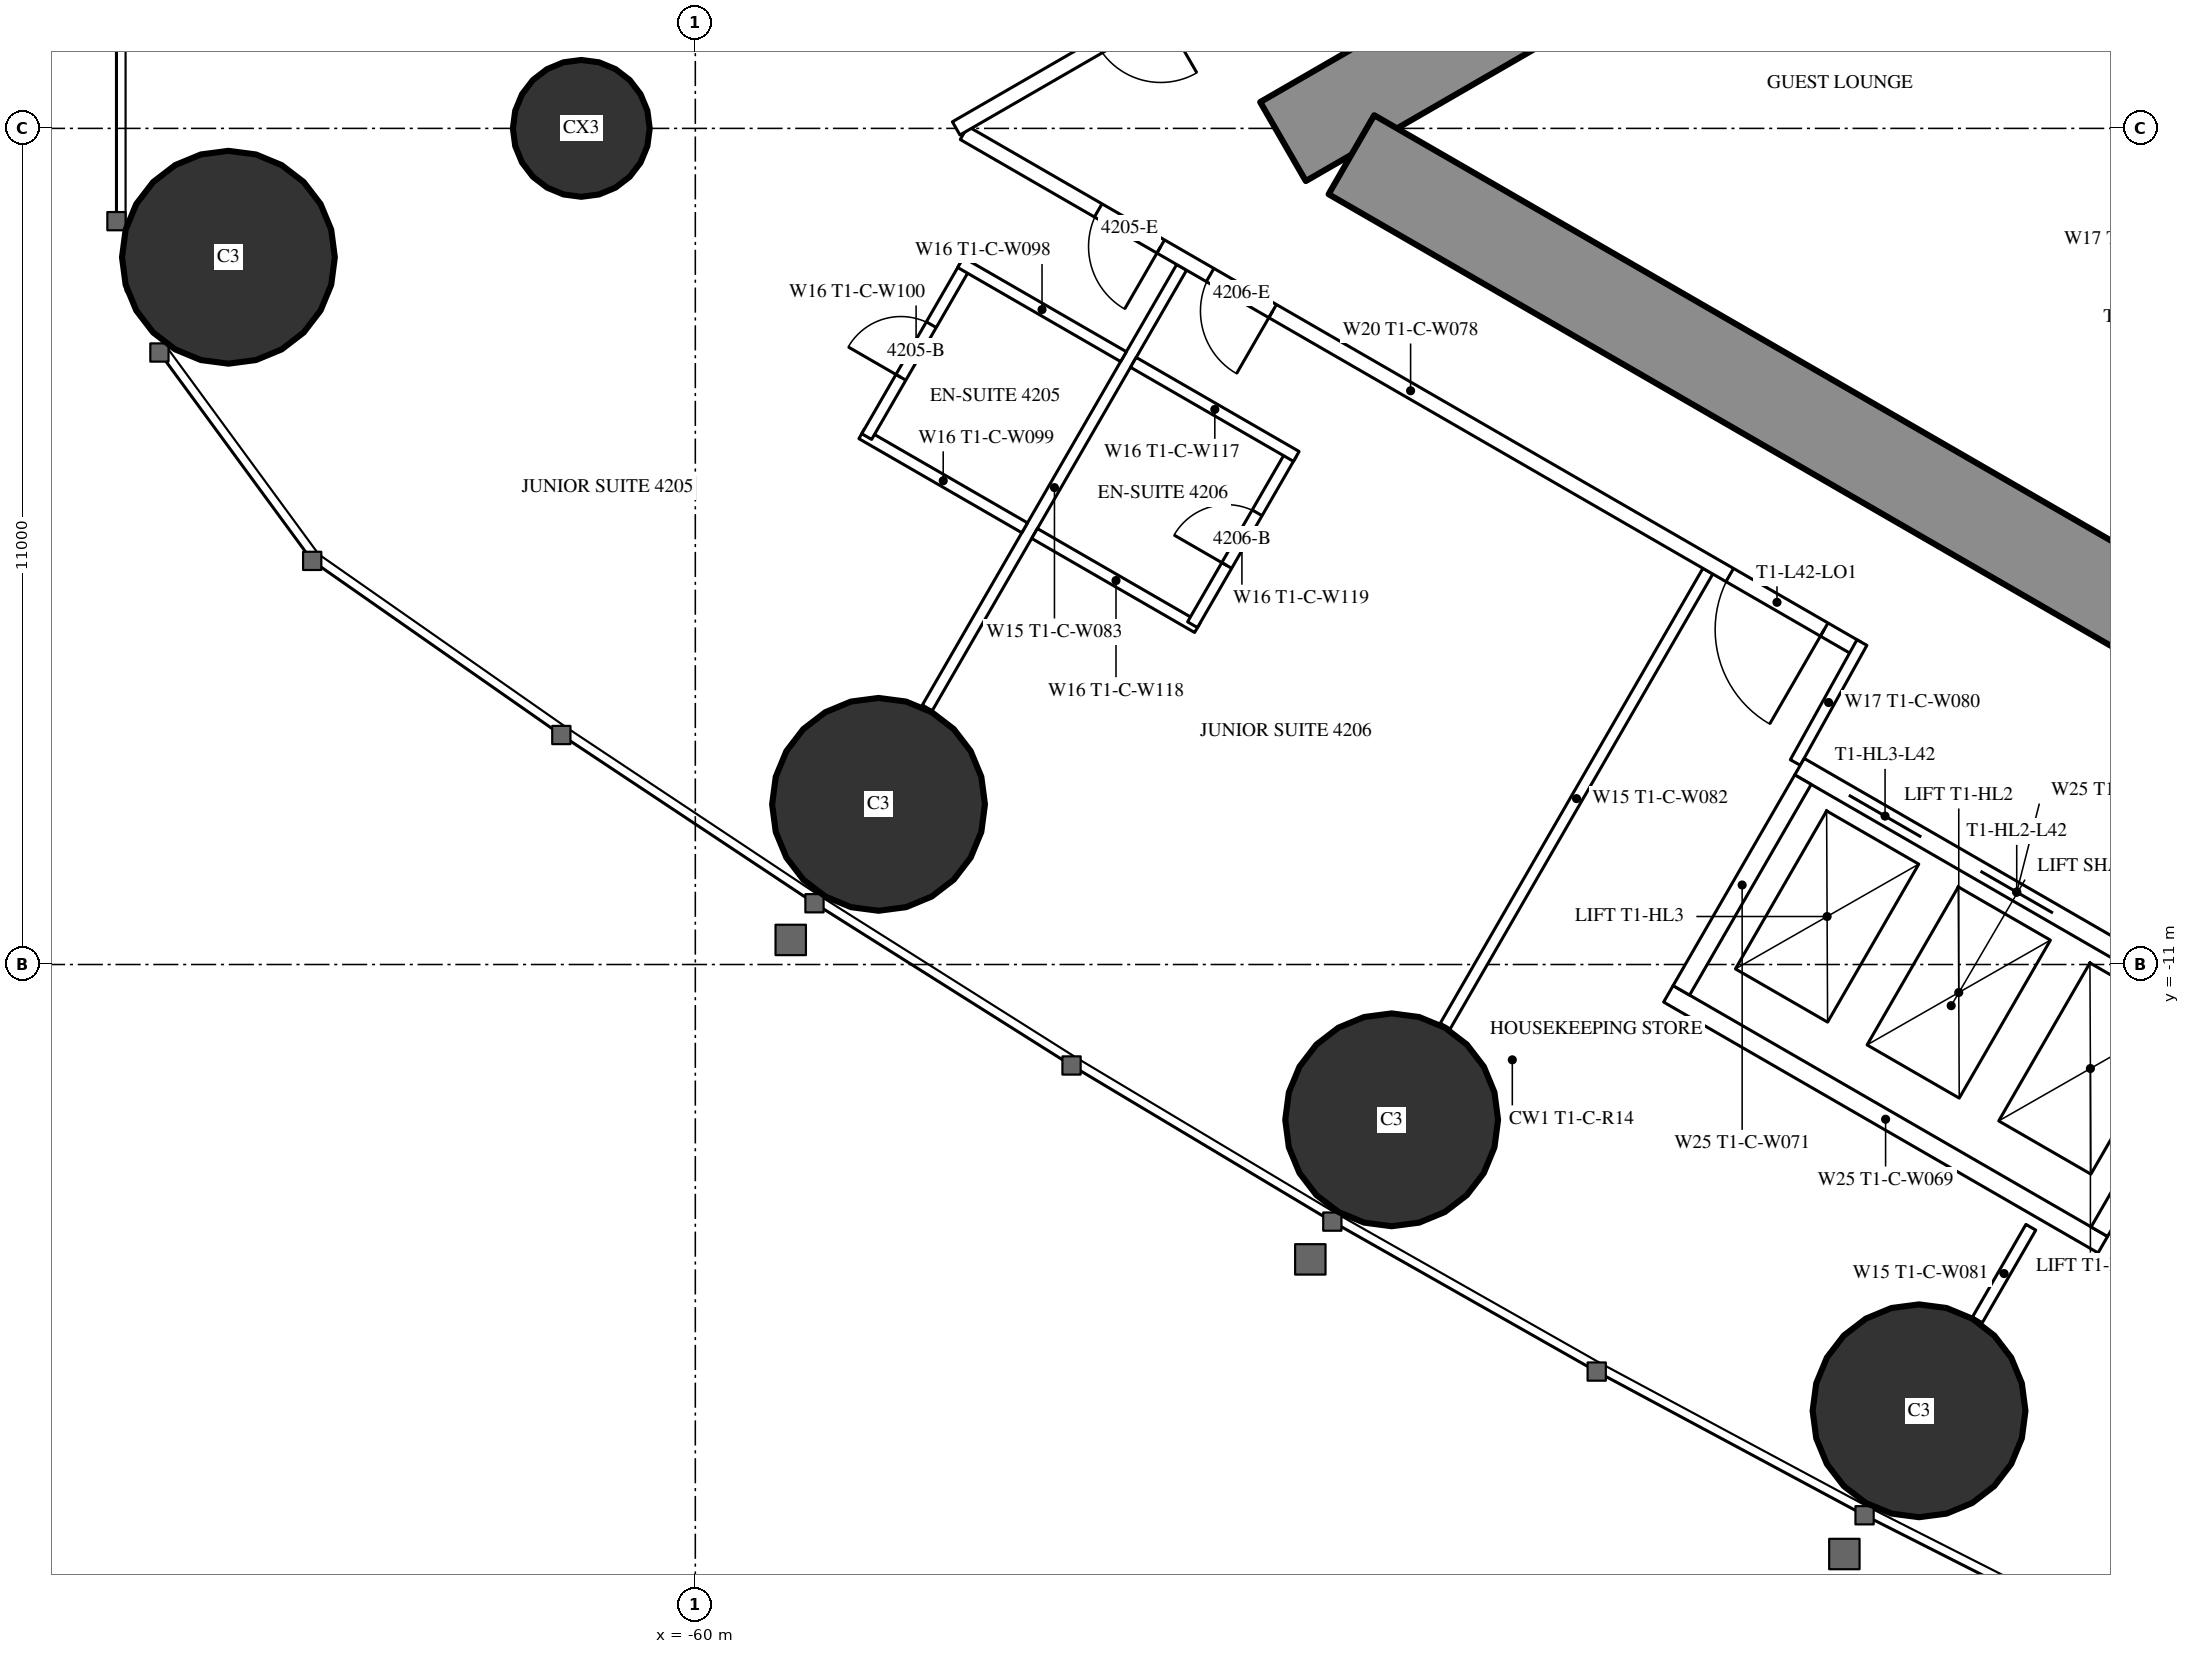
"""IFC4 building model, lengths in metres.
Left out: names, types, materials, properties, quantities, classifications, styles, units other than length and angle.
Written with IfcOpenShell. Run it as: python <this file> out.ifc"""

import sys

from ifc_helpers import new_model, si_unit, direction, frame, frame_2d, origin, origin_2d, place, context, subcontext, project, spatial, rectangle, circle, extrude, element, fill, save


model = new_model("IFC4")
c1 = context("Model", 3, precision=1e-05, world=origin(), true_north=direction((0.0, 1.0)))
c2 = subcontext(c1, "Body", "Model", "MODEL_VIEW")
j1 = project(units=[si_unit("LENGTHUNIT", "METRE"), si_unit("PLANEANGLEUNIT", "RADIAN")], contexts=[c1])
p1 = place(None, origin())
s1 = spatial("IfcSite", under=j1, at=p1, CompositionType="ELEMENT")
p2 = place(p1, origin())
s2 = spatial("IfcBuilding", under=s1, at=p2, CompositionType="ELEMENT")
p3 = place(p2, frame((0.0, 0.0, 159.8)))
s3 = spatial("IfcBuildingStorey", under=s2, at=p3, CompositionType="ELEMENT", Elevation=159.8)
for number, where, z_axis, x_axis in (
    (1, (-66.143, -1.695, 0.0), (0.0, 0.0, 1.0), (1.0, 0.0, 0.0)),
    (2, (-57.59, -8.893, 0.0), (0.0, 0.0, 1.0), (1.0, 0.0, 0.0)),
    (3, (-50.839, -13.043, 0.0), (0.0, 0.0, 1.0), (1.0, 0.0, 0.0)),
    (4, (-43.9, -16.871, 0.0), (0.0, 0.0, 1.0), (1.0, 0.0, 0.0)),
):
    element("IfcColumn", number, at=place(p3, frame(where, z_axis=z_axis, x_axis=x_axis)), inside=s3, PredefinedType="COLUMN", context=c2, shape_type="SweptSolid", body=[
        extrude(circle(Radius=1.4, at=origin_2d()), origin(), (0.0, 0.0, 1.0), 3.5),
    ])
p4 = place(p3, frame((-61.5, 0.0, 0.0), z_axis=(0.0, 0.0, 1.0), x_axis=(1.0, 0.0, 0.0)))
e5 = element("IfcColumn", 5, at=p4, inside=s3, PredefinedType="COLUMN", context=c2, shape_type="SweptSolid", body=[
    extrude(circle(Radius=0.9, at=origin_2d()), origin(), (0.0, 0.0, 1.0), 3.5),
])
p5 = place(p3, frame((-27.2, 14.3, 0.0), z_axis=(0.0, 0.0, 1.0), x_axis=(-0.866026593062, -0.499997940104, 0.0)))
e6 = element("IfcWall", 6, at=p5, inside=s3, PredefinedType="SHEAR", context=c2, shape_type="SweptSolid", body=[
    extrude(rectangle(XDim=28.946, YDim=1.2, at=frame_2d((14.473, 0.0))), origin(), (0.0, 0.0, 1.0), 3.5),
])
p6 = place(p5, frame((4.6, 0.0, 0.0)))
e7 = element("IfcOpeningElement", 7, at=p6, cuts=e6, PredefinedType="OPENING", context=c2, shape_type="SweptSolid", body=[
    extrude(rectangle(XDim=1.0, YDim=2.2, at=frame_2d((0.5, 1.1))), frame((0.0, 0.61, 0.0), z_axis=(0.0, -1.0, 0.0), x_axis=(1.0, 0.0, 0.0)), (0.0, 0.0, 1.0), 1.22),
])
p7 = place(p5, frame((13.395, 0.0, 0.0)))
e8 = element("IfcOpeningElement", 8, at=p7, cuts=e6, PredefinedType="OPENING", context=c2, shape_type="SweptSolid", body=[
    extrude(rectangle(XDim=1.8, YDim=2.2, at=frame_2d((0.9, 1.1))), frame((0.0, 0.61, 0.0), z_axis=(0.0, -1.0, 0.0), x_axis=(1.0, 0.0, 0.0)), (0.0, 0.0, 1.0), 1.22),
])
p8 = place(p3, frame((-27.2, -14.3, 0.0), z_axis=(0.0, 0.0, 1.0), x_axis=(-0.866024021859, 0.500002393557, 0.0)))
e9 = element("IfcWall", 9, at=p8, inside=s3, PredefinedType="SHEAR", context=c2, shape_type="SweptSolid", body=[
    extrude(rectangle(XDim=27.907, YDim=1.2, at=frame_2d((13.954, 0.0))), origin(), (0.0, 0.0, 1.0), 3.5),
])
p9 = place(p8, frame((4.6, 0.0, 0.0)))
e10 = element("IfcOpeningElement", 10, at=p9, cuts=e9, PredefinedType="OPENING", context=c2, shape_type="SweptSolid", body=[
    extrude(rectangle(XDim=1.0, YDim=2.2, at=frame_2d((0.5, 1.1))), frame((0.0, 0.61, 0.0), z_axis=(0.0, -1.0, 0.0), x_axis=(1.0, 0.0, 0.0)), (0.0, 0.0, 1.0), 1.22),
])
p10 = place(p8, frame((13.395, 0.0, 0.0)))
e11 = element("IfcOpeningElement", 11, at=p10, cuts=e9, PredefinedType="OPENING", context=c2, shape_type="SweptSolid", body=[
    extrude(rectangle(XDim=1.8, YDim=2.2, at=frame_2d((0.9, 1.1))), frame((0.0, 0.61, 0.0), z_axis=(0.0, -1.0, 0.0), x_axis=(1.0, 0.0, 0.0)), (0.0, 0.0, 1.0), 1.22),
])
p11 = place(p3, frame((-46.679, -5.825, 0.0), z_axis=(0.0, 0.0, 1.0), x_axis=(-0.500006839597, -0.866021454905, 0.0)))
e12 = element("IfcWall", 12, at=p11, inside=s3, PredefinedType="PARTITIONING", context=c2, shape_type="SweptSolid", body=[
    extrude(rectangle(XDim=6.911, YDim=0.15, at=frame_2d((3.456, 0.0))), origin(), (0.0, 0.0, 1.0), 2.3),
])
p12 = place(p3, frame((-53.602, -1.828, 0.0), z_axis=(0.0, 0.0, 1.0), x_axis=(-0.49999191814, -0.866030069798, 0.0)))
e13 = element("IfcWall", 13, at=p12, inside=s3, PredefinedType="PARTITIONING", context=c2, shape_type="SweptSolid", body=[
    extrude(rectangle(XDim=6.692, YDim=0.15, at=frame_2d((3.346, 0.0))), origin(), (0.0, 0.0, 1.0), 2.3),
])
p13 = place(p3, frame((-42.429, -14.457, 0.0), z_axis=(0.0, 0.0, 1.0), x_axis=(-0.5000578829, -0.865991982497, 0.0)))
e14 = element("IfcWall", 14, at=p13, inside=s3, PredefinedType="PARTITIONING", context=c2, shape_type="SweptSolid", body=[
    extrude(rectangle(XDim=1.407, YDim=0.15, at=frame_2d((0.704, 0.0))), origin(), (0.0, 0.0, 1.0), 3.25),
])
p14 = place(p3, frame((-44.715, -6.844, 0.0), z_axis=(0.0, 0.0, 1.0), x_axis=(-0.866025261224, 0.500000246922, 0.0)))
e15 = element("IfcWall", 15, at=p14, inside=s3, PredefinedType="PARTITIONING", context=c2, shape_type="SweptSolid", body=[
    extrude(rectangle(XDim=13.567, YDim=0.2, at=frame_2d((6.783, 0.0))), origin(), (0.0, 0.0, 1.0), 3.25),
])
p15 = place(p14, frame((10.579, 0.0, 0.0)))
e16 = element("IfcOpeningElement", 16, at=p15, cuts=e15, PredefinedType="OPENING", context=c2, shape_type="SweptSolid", body=[
    extrude(rectangle(XDim=0.95, YDim=2.2, at=frame_2d((0.475, 1.1))), frame((0.0, 0.11, 0.0), z_axis=(0.0, -1.0, 0.0), x_axis=(1.0, 0.0, 0.0)), (0.0, 0.0, 1.0), 0.22),
])
p16 = place(p14, frame((8.879, 0.0, 0.0)))
e17 = element("IfcOpeningElement", 17, at=p16, cuts=e15, PredefinedType="OPENING", context=c2, shape_type="SweptSolid", body=[
    extrude(rectangle(XDim=0.95, YDim=2.2, at=frame_2d((0.475, 1.1))), frame((0.0, 0.11, 0.0), z_axis=(0.0, -1.0, 0.0), x_axis=(1.0, 0.0, 0.0)), (0.0, 0.0, 1.0), 0.22),
])
p17 = place(p14, frame((0.5, 0.0, 0.0)))
e18 = element("IfcOpeningElement", 18, at=p17, cuts=e15, PredefinedType="OPENING", context=c2, shape_type="SweptSolid", body=[
    extrude(rectangle(XDim=1.435, YDim=2.2, at=frame_2d((0.718, 1.1))), frame((0.0, 0.11, 0.0), z_axis=(0.0, -1.0, 0.0), x_axis=(1.0, 0.0, 0.0)), (0.0, 0.0, 1.0), 0.22),
])
p18 = place(p3, frame((-44.652, -6.764, 0.0), z_axis=(0.0, 0.0, 1.0), x_axis=(-0.485424724123, -0.874278466629, 0.0)))
e19 = element("IfcWall", 19, at=p18, inside=s3, PredefinedType="PARTITIONING", context=c2, shape_type="SweptSolid", body=[
    extrude(rectangle(XDim=1.805, YDim=0.15, at=frame_2d((0.903, 0.0))), origin(), (0.0, 0.0, 1.0), 3.25),
])
p19 = place(p3, frame((-46.65, 5.726, 0.0), z_axis=(0.0, 0.0, 1.0), x_axis=(-0.866027963864, -0.499995565786, 0.0)))
e20 = element("IfcWall", 20, at=p19, inside=s3, PredefinedType="PARTITIONING", context=c2, shape_type="SweptSolid", body=[
    extrude(rectangle(XDim=11.452, YDim=0.2, at=frame_2d((5.726, 0.0))), origin(), (0.0, 0.0, 1.0), 3.25),
])
p20 = place(p19, frame((4.294, 0.0, 0.0)))
e21 = element("IfcOpeningElement", 21, at=p20, cuts=e20, PredefinedType="OPENING", context=c2, shape_type="SweptSolid", body=[
    extrude(rectangle(XDim=0.95, YDim=2.2, at=frame_2d((0.475, 1.1))), frame((0.0, 0.11, 0.0), z_axis=(0.0, -1.0, 0.0), x_axis=(1.0, 0.0, 0.0)), (0.0, 0.0, 1.0), 0.22),
])
p21 = place(p19, frame((8.344, 0.0, 0.0)))
e22 = element("IfcOpeningElement", 22, at=p21, cuts=e20, PredefinedType="OPENING", context=c2, shape_type="SweptSolid", body=[
    extrude(rectangle(XDim=0.95, YDim=2.2, at=frame_2d((0.475, 1.1))), frame((0.0, 0.11, 0.0), z_axis=(0.0, -1.0, 0.0), x_axis=(1.0, 0.0, 0.0)), (0.0, 0.0, 1.0), 0.22),
])
p22 = place(p3, frame((-55.667, -5.255, 0.0), z_axis=(0.0, 0.0, 1.0), x_axis=(-0.866006523861, 0.500032699561, 0.0)))
e23 = element("IfcWall", 23, at=p22, inside=s3, PredefinedType="PARTITIONING", context=c2, shape_type="SweptSolid", body=[
    extrude(rectangle(XDim=2.475, YDim=0.15, at=frame_2d((1.237, 0.0))), origin(), (0.0, 0.0, 1.0), 3.25),
])
p23 = place(p3, frame((-56.446, -1.803, 0.0), z_axis=(0.0, 0.0, 1.0), x_axis=(-0.499936506574, -0.866062058628, 0.0)))
e24 = element("IfcWall", 24, at=p23, inside=s3, PredefinedType="PARTITIONING", context=c2, shape_type="SweptSolid", body=[
    extrude(rectangle(XDim=2.6, YDim=0.15, at=frame_2d((1.3, 0.0))), origin(), (0.0, 0.0, 1.0), 3.25),
])
p24 = place(p23, frame((0.9, 0.0, 0.0)))
e25 = element("IfcOpeningElement", 25, at=p24, cuts=e24, PredefinedType="OPENING", context=c2, shape_type="SweptSolid", body=[
    extrude(rectangle(XDim=0.8, YDim=2.2, at=frame_2d((0.4, 1.1))), frame((0.0, 0.085, 0.0), z_axis=(0.0, -1.0, 0.0), x_axis=(1.0, 0.0, 0.0)), (0.0, 0.0, 1.0), 0.17),
])
for number, where, z_axis, x_axis in (
    (26, (-54.367, -3.003, 0.0), (0.0, 0.0, 1.0), (-0.866, 0.5, 0.0)),
    (27, (-53.394, -6.567, 0.0), (0.0, 0.0, 1.0), (-0.866, 0.5, 0.0)),
):
    element("IfcWall", number, at=place(p3, frame(where, z_axis=z_axis, x_axis=x_axis)), inside=s3, PredefinedType="PARTITIONING", context=c2, shape_type="SweptSolid", body=[
        extrude(rectangle(XDim=2.475, YDim=0.15, at=frame_2d((1.238, 0.0))), origin(), (0.0, 0.0, 1.0), 3.25),
    ])
p25 = place(p3, frame((-52.159, -4.278, 0.0), z_axis=(0.0, 0.0, 1.0), x_axis=(-0.500047596559, -0.865997922154, 0.0)))
e28 = element("IfcWall", 28, at=p25, inside=s3, PredefinedType="PARTITIONING", context=c2, shape_type="SweptSolid", body=[
    extrude(rectangle(XDim=2.6, YDim=0.15, at=frame_2d((1.3, 0.0))), origin(), (0.0, 0.0, 1.0), 3.25),
])
p26 = place(p25, frame((0.9, 0.0, 0.0)))
e29 = element("IfcOpeningElement", 29, at=p26, cuts=e28, PredefinedType="OPENING", context=c2, shape_type="SweptSolid", body=[
    extrude(rectangle(XDim=0.8, YDim=2.2, at=frame_2d((0.4, 1.1))), frame((0.0, 0.085, 0.0), z_axis=(0.0, -1.0, 0.0), x_axis=(1.0, 0.0, 0.0)), (0.0, 0.0, 1.0), 0.17),
])
p27 = place(p3, frame((-52.094, -4.315, 0.0), z_axis=(0.0, 0.0, 1.0), x_axis=(-0.866006523861, 0.500032699561, 0.0)))
e30 = element("IfcWall", 30, at=p27, inside=s3, PredefinedType="PARTITIONING", context=c2, shape_type="SweptSolid", body=[
    extrude(rectangle(XDim=2.475, YDim=0.15, at=frame_2d((1.237, 0.0))), origin(), (0.0, 0.0, 1.0), 2.45),
])
p28 = place(p3, frame((-39.758, -11.697, 0.0), z_axis=(0.0, 0.0, 1.0), x_axis=(-0.866024194504, 0.500002094529, 0.0)))
e31 = element("IfcWall", 31, at=p28, inside=s3, PredefinedType="PARTITIONING", context=c2, shape_type="SweptSolid", body=[
    extrude(rectangle(XDim=6.6, YDim=0.25, at=frame_2d((3.3, 0.0))), origin(), (0.0, 0.0, 1.0), 3.25),
])
p29 = place(p28, frame((0.75, 0.0, 0.0)))
e32 = element("IfcOpeningElement", 32, at=p29, cuts=e31, PredefinedType="OPENING", context=c2, shape_type="SweptSolid", body=[
    extrude(rectangle(XDim=1.1, YDim=2.2, at=frame_2d((0.55, 1.1))), frame((0.0, 0.135, 0.0), z_axis=(0.0, -1.0, 0.0), x_axis=(1.0, 0.0, 0.0)), (0.0, 0.0, 1.0), 0.27),
])
p30 = place(p28, frame((2.75, 0.0, 0.0)))
e33 = element("IfcOpeningElement", 33, at=p30, cuts=e31, PredefinedType="OPENING", context=c2, shape_type="SweptSolid", body=[
    extrude(rectangle(XDim=1.1, YDim=2.2, at=frame_2d((0.55, 1.1))), frame((0.0, 0.135, 0.0), z_axis=(0.0, -1.0, 0.0), x_axis=(1.0, 0.0, 0.0)), (0.0, 0.0, 1.0), 0.27),
])
p31 = place(p28, frame((4.75, 0.0, 0.0)))
e34 = element("IfcOpeningElement", 34, at=p31, cuts=e31, PredefinedType="OPENING", context=c2, shape_type="SweptSolid", body=[
    extrude(rectangle(XDim=1.1, YDim=2.2, at=frame_2d((0.55, 1.1))), frame((0.0, 0.135, 0.0), z_axis=(0.0, -1.0, 0.0), x_axis=(1.0, 0.0, 0.0)), (0.0, 0.0, 1.0), 0.27),
])
p32 = place(p3, frame((-41.482, -14.686, 0.0), z_axis=(0.0, 0.0, 1.0), x_axis=(-0.86603344179, 0.499986077507, 0.0)))
e35 = element("IfcWall", 35, at=p32, inside=s3, PredefinedType="PARTITIONING", context=c2, shape_type="SweptSolid", body=[
    extrude(rectangle(XDim=6.6, YDim=0.25, at=frame_2d((3.3, 0.0))), origin(), (0.0, 0.0, 1.0), 3.25),
])
for number, where, z_axis, x_axis in (
    (36, (-39.928, -11.743, 0.0), (0.0, 0.0, 1.0), (-0.5, -0.866, 0.0)),
    (37, (-45.428, -8.568, 0.0), (0.0, 0.0, 1.0), (-0.5, -0.866, 0.0)),
):
    element("IfcWall", number, at=place(p3, frame(where, z_axis=z_axis, x_axis=x_axis)), inside=s3, PredefinedType="PARTITIONING", context=c2, shape_type="SweptSolid", body=[
        extrude(rectangle(XDim=3.201, YDim=0.25, at=frame_2d((1.6, 0.0))), origin(), (0.0, 0.0, 1.0), 3.25),
    ])
p33 = place(p24, origin())
e38 = element("IfcDoor", 38, at=p33, inside=s3, OperationType="SINGLE_SWING_RIGHT", PredefinedType="DOOR", context=c2, shape_type="SweptSolid", body=[
    extrude(rectangle(XDim=0.8, YDim=2.2, at=frame_2d((0.4, 1.1))), frame((0.0, 0.025, 0.0), z_axis=(0.0, -1.0, 0.0), x_axis=(1.0, 0.0, 0.0)), (0.0, 0.0, 1.0), 0.05),
])
fill(e25, e38)
p34 = place(p15, origin())
e39 = element("IfcDoor", 39, at=p34, inside=s3, OperationType="SINGLE_SWING_LEFT", PredefinedType="DOOR", context=c2, shape_type="SweptSolid", body=[
    extrude(rectangle(XDim=0.95, YDim=2.2, at=frame_2d((0.475, 1.1))), frame((0.0, 0.025, 0.0), z_axis=(0.0, -1.0, 0.0), x_axis=(1.0, 0.0, 0.0)), (0.0, 0.0, 1.0), 0.05),
])
fill(e16, e39)
p35 = place(p26, origin())
e40 = element("IfcDoor", 40, at=p35, inside=s3, OperationType="SINGLE_SWING_RIGHT", PredefinedType="DOOR", context=c2, shape_type="SweptSolid", body=[
    extrude(rectangle(XDim=0.8, YDim=2.2, at=frame_2d((0.4, 1.1))), frame((0.0, 0.025, 0.0), z_axis=(0.0, -1.0, 0.0), x_axis=(1.0, 0.0, 0.0)), (0.0, 0.0, 1.0), 0.05),
])
fill(e29, e40)
p36 = place(p16, origin())
e41 = element("IfcDoor", 41, at=p36, inside=s3, OperationType="SINGLE_SWING_LEFT", PredefinedType="DOOR", context=c2, shape_type="SweptSolid", body=[
    extrude(rectangle(XDim=0.95, YDim=2.2, at=frame_2d((0.475, 1.1))), frame((0.0, 0.025, 0.0), z_axis=(0.0, -1.0, 0.0), x_axis=(1.0, 0.0, 0.0)), (0.0, 0.0, 1.0), 0.05),
])
fill(e17, e41)
p37 = place(p17, origin())
e42 = element("IfcDoor", 42, at=p37, inside=s3, OperationType="SINGLE_SWING_LEFT", PredefinedType="DOOR", context=c2, shape_type="SweptSolid", body=[
    extrude(rectangle(XDim=1.435, YDim=2.2, at=frame_2d((0.718, 1.1))), frame((0.0, 0.025, 0.0), z_axis=(0.0, -1.0, 0.0), x_axis=(1.0, 0.0, 0.0)), (0.0, 0.0, 1.0), 0.05),
])
fill(e18, e42)
p38 = place(p30, origin())
e43 = element("IfcDoor", 43, at=p38, inside=s3, OperationType="DOUBLE_DOOR_SLIDING", PredefinedType="USERDEFINED", context=c2, shape_type="SweptSolid", body=[
    extrude(rectangle(XDim=1.1, YDim=2.2, at=frame_2d((0.55, 1.1))), frame((0.0, 0.025, 0.0), z_axis=(0.0, -1.0, 0.0), x_axis=(1.0, 0.0, 0.0)), (0.0, 0.0, 1.0), 0.05),
])
fill(e33, e43)
p39 = place(p31, origin())
e44 = element("IfcDoor", 44, at=p39, inside=s3, OperationType="DOUBLE_DOOR_SLIDING", PredefinedType="USERDEFINED", context=c2, shape_type="SweptSolid", body=[
    extrude(rectangle(XDim=1.1, YDim=2.2, at=frame_2d((0.55, 1.1))), frame((0.0, 0.025, 0.0), z_axis=(0.0, -1.0, 0.0), x_axis=(1.0, 0.0, 0.0)), (0.0, 0.0, 1.0), 0.05),
])
fill(e34, e44)
save(model, sys.argv[1])
